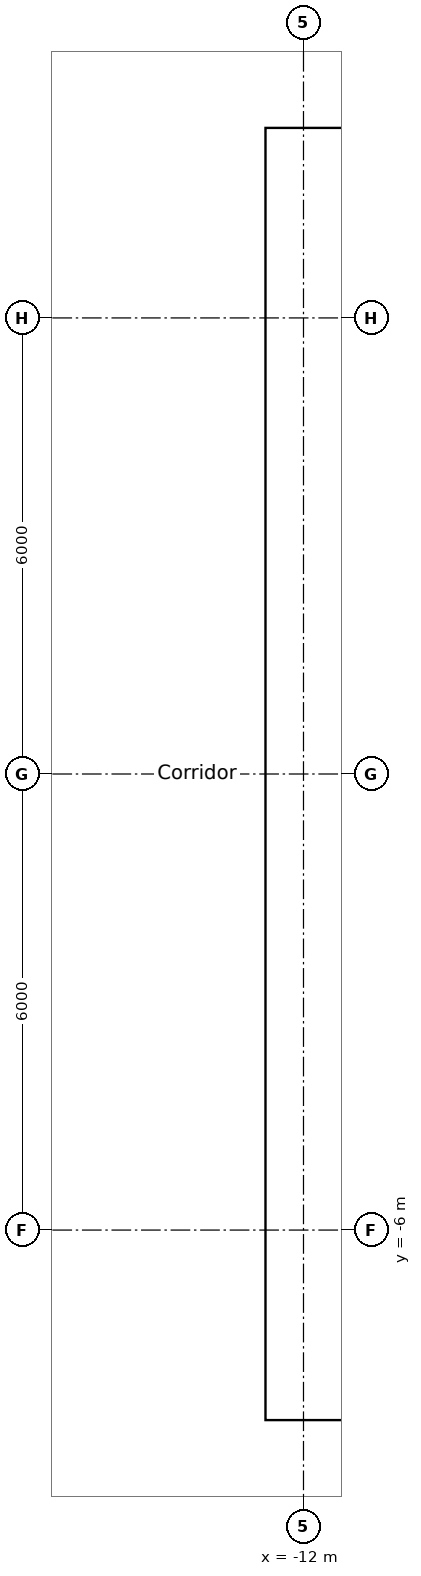
"""IFC4 building model, lengths in metres.
Left out: names, types, materials, properties, quantities, classifications, styles, units other than length and angle.
Written with IfcOpenShell. Run it as: python <this file> out.ifc"""

import sys

from ifc_helpers import new_model, si_unit, direction, frame, frame_2d, origin, place, context, subcontext, project, spatial, rectangle, extrude, element, fill, save


model = new_model("IFC4")
c1 = context("Model", 3, precision=1e-05, world=origin(), true_north=direction((0.0, 1.0)))
c2 = subcontext(c1, "Body", "Model", "MODEL_VIEW")
j1 = project(units=[si_unit("LENGTHUNIT", "METRE"), si_unit("PLANEANGLEUNIT", "RADIAN")], contexts=[c1])
p1 = place(None, origin())
s1 = spatial("IfcSite", under=j1, at=p1, CompositionType="ELEMENT")
p2 = place(p1, origin())
s2 = spatial("IfcBuilding", under=s1, at=p2, CompositionType="ELEMENT")
p3 = place(p2, frame((0.0, 0.0, 136.8)))
s3 = spatial("IfcBuildingStorey", under=s2, at=p3, CompositionType="ELEMENT", Elevation=136.8)
p4 = place(p3, frame((-12.5, -8.05, 0.0), z_axis=(0.0, 0.0, 1.0), x_axis=(1.0, 0.0, 0.0)))
e1 = element("IfcWall", 1, at=p4, inside=s3, PredefinedType="SOLIDWALL", context=c2, shape_type="SweptSolid", body=[
    extrude(rectangle(XDim=25.0, YDim=0.9, at=frame_2d((12.5, 0.0))), origin(), (0.0, 0.0, 1.0), 3.6),
])
p5 = place(p4, frame((13.4, 0.0, 0.0)))
e2 = element("IfcOpeningElement", 2, at=p5, cuts=e1, PredefinedType="OPENING", context=c2, shape_type="SweptSolid", body=[
    extrude(rectangle(XDim=1.0, YDim=2.1, at=frame_2d((0.5, 1.05))), frame((0.0, 0.45, 0.0), z_axis=(0.0, -1.0, 0.0), x_axis=(1.0, 0.0, 0.0)), (0.0, 0.0, 1.0), 0.9),
])
p6 = place(p4, frame((8.3, 0.0, 0.0)))
e3 = element("IfcOpeningElement", 3, at=p6, cuts=e1, PredefinedType="OPENING", context=c2, shape_type="SweptSolid", body=[
    extrude(rectangle(XDim=1.8, YDim=2.1, at=frame_2d((0.9, 1.05))), frame((0.0, 0.45, 0.0), z_axis=(0.0, -1.0, 0.0), x_axis=(1.0, 0.0, 0.0)), (0.0, 0.0, 1.0), 0.9),
])
p7 = place(p4, frame((14.9, 0.0, 0.0)))
e4 = element("IfcOpeningElement", 4, at=p7, cuts=e1, PredefinedType="OPENING", context=c2, shape_type="SweptSolid", body=[
    extrude(rectangle(XDim=1.8, YDim=2.1, at=frame_2d((0.9, 1.05))), frame((0.0, 0.45, 0.0), z_axis=(0.0, -1.0, 0.0), x_axis=(1.0, 0.0, 0.0)), (0.0, 0.0, 1.0), 0.9),
])
p8 = place(p3, frame((-12.5, 8.05, 0.0), z_axis=(0.0, 0.0, 1.0), x_axis=(1.0, 0.0, 0.0)))
e5 = element("IfcWall", 5, at=p8, inside=s3, PredefinedType="SOLIDWALL", context=c2, shape_type="SweptSolid", body=[
    extrude(rectangle(XDim=25.0, YDim=0.9, at=frame_2d((12.5, 0.0))), origin(), (0.0, 0.0, 1.0), 3.6),
])
p9 = place(p8, frame((8.3, 0.0, 0.0)))
e6 = element("IfcOpeningElement", 6, at=p9, cuts=e5, PredefinedType="OPENING", context=c2, shape_type="SweptSolid", body=[
    extrude(rectangle(XDim=1.8, YDim=2.1, at=frame_2d((0.9, 1.05))), frame((0.0, 0.45, 0.0), z_axis=(0.0, -1.0, 0.0), x_axis=(1.0, 0.0, 0.0)), (0.0, 0.0, 1.0), 0.9),
])
p10 = place(p3, frame((-12.05, -7.6, 0.0), z_axis=(0.0, 0.0, 1.0), x_axis=(0.0, 1.0, 0.0)))
e7 = element("IfcWall", 7, at=p10, inside=s3, PredefinedType="SOLIDWALL", context=c2, shape_type="SweptSolid", body=[
    extrude(rectangle(XDim=15.2, YDim=0.9, at=frame_2d((7.6, 0.0))), origin(), (0.0, 0.0, 1.0), 3.6),
])
p11 = place(p10, frame((7.1, 0.0, 0.0)))
e8 = element("IfcOpeningElement", 8, at=p11, cuts=e7, PredefinedType="OPENING", context=c2, shape_type="SweptSolid", body=[
    extrude(rectangle(XDim=1.0, YDim=2.1, at=frame_2d((0.5, 1.05))), frame((0.0, 0.45, 0.0), z_axis=(0.0, -1.0, 0.0), x_axis=(1.0, 0.0, 0.0)), (0.0, 0.0, 1.0), 0.9),
])
p12 = place(p3, frame((-11.6, -4.55, 0.0), z_axis=(0.0, 0.0, 1.0), x_axis=(1.0, 0.0, 0.0)))
e9 = element("IfcWall", 9, at=p12, inside=s3, PredefinedType="SOLIDWALL", context=c2, shape_type="SweptSolid", body=[
    extrude(rectangle(XDim=2.4, YDim=0.3, at=frame_2d((1.2, 0.0))), origin(), (0.0, 0.0, 1.0), 3.3),
])
p13 = place(p12, frame((0.65, 0.0, 0.0)))
e10 = element("IfcOpeningElement", 10, at=p13, cuts=e9, PredefinedType="OPENING", context=c2, shape_type="SweptSolid", body=[
    extrude(rectangle(XDim=1.1, YDim=2.1, at=frame_2d((0.55, 1.05))), frame((0.0, 0.15, 0.0), z_axis=(0.0, -1.0, 0.0), x_axis=(1.0, 0.0, 0.0)), (0.0, 0.0, 1.0), 0.3),
])
p14 = place(p3, frame((-11.6, 4.55, 0.0), z_axis=(0.0, 0.0, 1.0), x_axis=(1.0, 0.0, 0.0)))
e11 = element("IfcWall", 11, at=p14, inside=s3, PredefinedType="SOLIDWALL", context=c2, shape_type="SweptSolid", body=[
    extrude(rectangle(XDim=2.4, YDim=0.3, at=frame_2d((1.2, 0.0))), origin(), (0.0, 0.0, 1.0), 3.3),
])
p15 = place(p14, frame((0.65, 0.0, 0.0)))
e12 = element("IfcOpeningElement", 12, at=p15, cuts=e11, PredefinedType="OPENING", context=c2, shape_type="SweptSolid", body=[
    extrude(rectangle(XDim=1.1, YDim=2.1, at=frame_2d((0.55, 1.05))), frame((0.0, 0.15, 0.0), z_axis=(0.0, -1.0, 0.0), x_axis=(1.0, 0.0, 0.0)), (0.0, 0.0, 1.0), 0.3),
])
p16 = place(p3, frame((-18.69, 6.803, 0.0), z_axis=(0.0, 0.0, 1.0), x_axis=(0.500229307554, 0.865892972523, 0.0)))
e13 = element("IfcWall", 13, at=p16, inside=s3, PredefinedType="PARTITIONING", context=c2, shape_type="SweptSolid", body=[
    extrude(rectangle(XDim=6.907, YDim=0.15, at=frame_2d((3.454, 0.0))), origin(), (0.0, 0.0, 1.0), 3.3),
])
p17 = place(p16, frame((3.04, 0.0, 0.0)))
e14 = element("IfcOpeningElement", 14, at=p17, cuts=e13, PredefinedType="OPENING", context=c2, shape_type="SweptSolid", body=[
    extrude(rectangle(XDim=1.0, YDim=2.1, at=frame_2d((0.5, 1.05))), frame((0.0, 0.075, 0.0), z_axis=(0.0, -1.0, 0.0), x_axis=(1.0, 0.0, 0.0)), (0.0, 0.0, 1.0), 0.15),
])
p18 = place(p3, frame((-18.688, -6.802, 0.0), z_axis=(0.0, 0.0, 1.0), x_axis=(0.499914202267, -0.866074933462, 0.0)))
e15 = element("IfcWall", 15, at=p18, inside=s3, PredefinedType="PARTITIONING", context=c2, shape_type="SweptSolid", body=[
    extrude(rectangle(XDim=6.907, YDim=0.15, at=frame_2d((3.454, 0.0))), origin(), (0.0, 0.0, 1.0), 3.3),
])
p19 = place(p18, frame((3.003, 0.0, 0.0)))
e16 = element("IfcOpeningElement", 16, at=p19, cuts=e15, PredefinedType="OPENING", context=c2, shape_type="SweptSolid", body=[
    extrude(rectangle(XDim=1.8, YDim=2.1, at=frame_2d((0.9, 1.05))), frame((0.0, 0.075, 0.0), z_axis=(0.0, -1.0, 0.0), x_axis=(1.0, 0.0, 0.0)), (0.0, 0.0, 1.0), 0.15),
])
p20 = place(p11, origin())
e17 = element("IfcDoor", 17, at=p20, inside=s3, OperationType="DOUBLE_DOOR_SINGLE_SWING", PredefinedType="DOOR", context=c2, shape_type="SweptSolid", body=[
    extrude(rectangle(XDim=1.0, YDim=2.1, at=frame_2d((0.5, 1.05))), frame((0.0, 0.025, 0.0), z_axis=(0.0, -1.0, 0.0), x_axis=(1.0, 0.0, 0.0)), (0.0, 0.0, 1.0), 0.05),
])
fill(e8, e17)
save(model, sys.argv[1])
